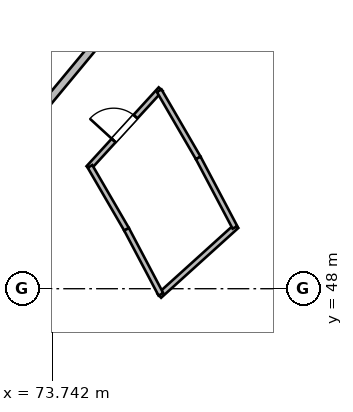
"""IFC4 building model, lengths in metres.
Left out: names, types, materials, properties, quantities, classifications, styles, units other than length and angle.
Written with IfcOpenShell. Run it as: python <this file> out.ifc"""

import sys

from ifc_helpers import new_model, si_unit, direction, frame, frame_2d, origin, place, context, subcontext, project, spatial, rectangle, extrude, source, transform, mapped, element, fill, save


model = new_model("IFC4")
c1 = context("Model", 3, precision=1e-05, world=origin(), true_north=direction((0.0, 1.0)))
c2 = subcontext(c1, "Body", "Model", "MODEL_VIEW")
j1 = project(units=[si_unit("LENGTHUNIT", "METRE"), si_unit("PLANEANGLEUNIT", "RADIAN")], contexts=[c1])
p1 = place(None, origin())
s1 = spatial("IfcSite", under=j1, at=p1, CompositionType="ELEMENT")
p2 = place(p1, origin())
s2 = spatial("IfcBuilding", under=s1, at=p2, CompositionType="ELEMENT")
p3 = place(p2, frame((0.0, 0.0, 67.8)))
s3 = spatial("IfcBuildingStorey", under=s2, at=p3, CompositionType="ELEMENT", Elevation=67.8)
m1 = source(origin(), c2, "Body", "SweptSolid", [
    extrude(rectangle(XDim=10.975, YDim=0.21, at=frame_2d((5.487, 0.0))), origin(), (0.0, 0.0, 1.0), 3.36),
])
p4 = place(p3, frame((73.46, 52.719, 0.0), z_axis=(0.0, 0.0, 1.0), x_axis=(0.638125265812, 0.769932558821, 0.0)))
e1 = element("IfcWall", 1, at=p4, inside=s3, PredefinedType="PARTITIONING", context=c2, shape_type="MappedRepresentation", body=[
    mapped(m1, transform((0.0, 0.0, 0.0), scale=1.0)),
])
m2 = source(origin(), c2, "Body", "SweptSolid", [
    extrude(rectangle(XDim=2.812, YDim=0.14, at=frame_2d((1.406, 0.0))), origin(), (0.0, 0.0, 1.0), 3.36),
])
p5 = place(p3, frame((74.697, 51.177, 0.0), z_axis=(0.0, 0.0, 1.0), x_axis=(0.675119025852, 0.737708818527, 0.0)))
e2 = element("IfcWall", 2, at=p5, inside=s3, PredefinedType="PARTITIONING", context=c2, shape_type="MappedRepresentation", body=[
    mapped(m2, transform((0.0, 0.0, 0.0), scale=1.0)),
])
p6 = place(p5, frame((0.981, 0.0, 0.0)))
e3 = element("IfcOpeningElement", 3, at=p6, cuts=e2, PredefinedType="OPENING", context=c2, shape_type="SweptSolid", body=[
    extrude(rectangle(XDim=0.85, YDim=2.05, at=frame_2d((0.425, 1.025))), frame((0.0, 0.08, 0.0), z_axis=(0.0, -1.0, 0.0), x_axis=(1.0, 0.0, 0.0)), (0.0, 0.0, 1.0), 0.16),
])
m3 = source(origin(), c2, "Body", "SweptSolid", [
    extrude(rectangle(XDim=2.738, YDim=0.14, at=frame_2d((1.369, 0.0))), origin(), (0.0, 0.0, 1.0), 3.36),
])
p7 = place(p3, frame((76.56, 47.814, 0.0), z_axis=(0.0, 0.0, 1.0), x_axis=(0.741873676582, 0.670539669218, 0.0)))
e4 = element("IfcWall", 4, at=p7, inside=s3, PredefinedType="PARTITIONING", context=c2, shape_type="MappedRepresentation", body=[
    mapped(m3, transform((0.0, 0.0, 0.0), scale=1.0)),
])
m4 = source(origin(), c2, "Body", "SweptSolid", [
    extrude(rectangle(XDim=1.914, YDim=0.14, at=frame_2d((0.957, 0.0))), origin(), (0.0, 0.0, 1.0), 3.36),
])
p8 = place(p3, frame((74.736, 51.219, 0.0), z_axis=(0.0, 0.0, 1.0), x_axis=(0.502347790612, -0.864665656347, 0.0)))
e5 = element("IfcWall", 5, at=p8, inside=s3, PredefinedType="PARTITIONING", context=c2, shape_type="MappedRepresentation", body=[
    mapped(m4, transform((0.0, 0.0, 0.0), scale=1.0)),
])
m5 = source(origin(), c2, "Body", "SweptSolid", [
    extrude(rectangle(XDim=2.045, YDim=0.14, at=frame_2d((1.022, 0.0))), origin(), (0.0, 0.0, 1.0), 3.36),
])
p9 = place(p3, frame((76.557, 53.209, 0.0), z_axis=(0.0, 0.0, 1.0), x_axis=(0.5023112139, -0.864686905411, 0.0)))
e6 = element("IfcWall", 6, at=p9, inside=s3, PredefinedType="PARTITIONING", context=c2, shape_type="MappedRepresentation", body=[
    mapped(m5, transform((0.0, 0.0, 0.0), scale=1.0)),
])
m6 = source(origin(), c2, "Body", "SweptSolid", [
    extrude(rectangle(XDim=1.936, YDim=0.14, at=frame_2d((0.968, 0.0))), origin(), (0.0, 0.0, 1.0), 3.36),
])
p10 = place(p3, frame((75.697, 49.563, 0.0), z_axis=(0.0, 0.0, 1.0), x_axis=(0.467174971862, -0.884164886017, 0.0)))
e7 = element("IfcWall", 7, at=p10, inside=s3, PredefinedType="PARTITIONING", context=c2, shape_type="MappedRepresentation", body=[
    mapped(m6, transform((0.0, 0.0, 0.0), scale=1.0)),
])
m7 = source(origin(), c2, "Body", "SweptSolid", [
    extrude(rectangle(XDim=2.068, YDim=0.14, at=frame_2d((1.034, 0.0))), origin(), (0.0, 0.0, 1.0), 3.36),
])
p11 = place(p3, frame((77.584, 51.441, 0.0), z_axis=(0.0, 0.0, 1.0), x_axis=(0.467215057643, -0.884143704333, 0.0)))
e8 = element("IfcWall", 8, at=p11, inside=s3, PredefinedType="PARTITIONING", context=c2, shape_type="MappedRepresentation", body=[
    mapped(m7, transform((0.0, 0.0, 0.0), scale=1.0)),
])
m8 = source(origin(), c2, "Body", "SweptSolid", [
    extrude(rectangle(XDim=0.85, YDim=2.05, at=frame_2d((0.425, 1.025))), frame((0.0, 0.025, 0.0), z_axis=(0.0, -1.0, 0.0), x_axis=(1.0, 0.0, 0.0)), (0.0, 0.0, 1.0), 0.05),
])
p12 = place(p6, origin())
e9 = element("IfcDoor", 9, at=p12, inside=s3, OperationType="SINGLE_SWING_LEFT", PredefinedType="DOOR", context=c2, shape_type="MappedRepresentation", body=[
    mapped(m8, transform((0.0, 0.0, 0.0), scale=1.0)),
])
fill(e3, e9)
save(model, sys.argv[1])
